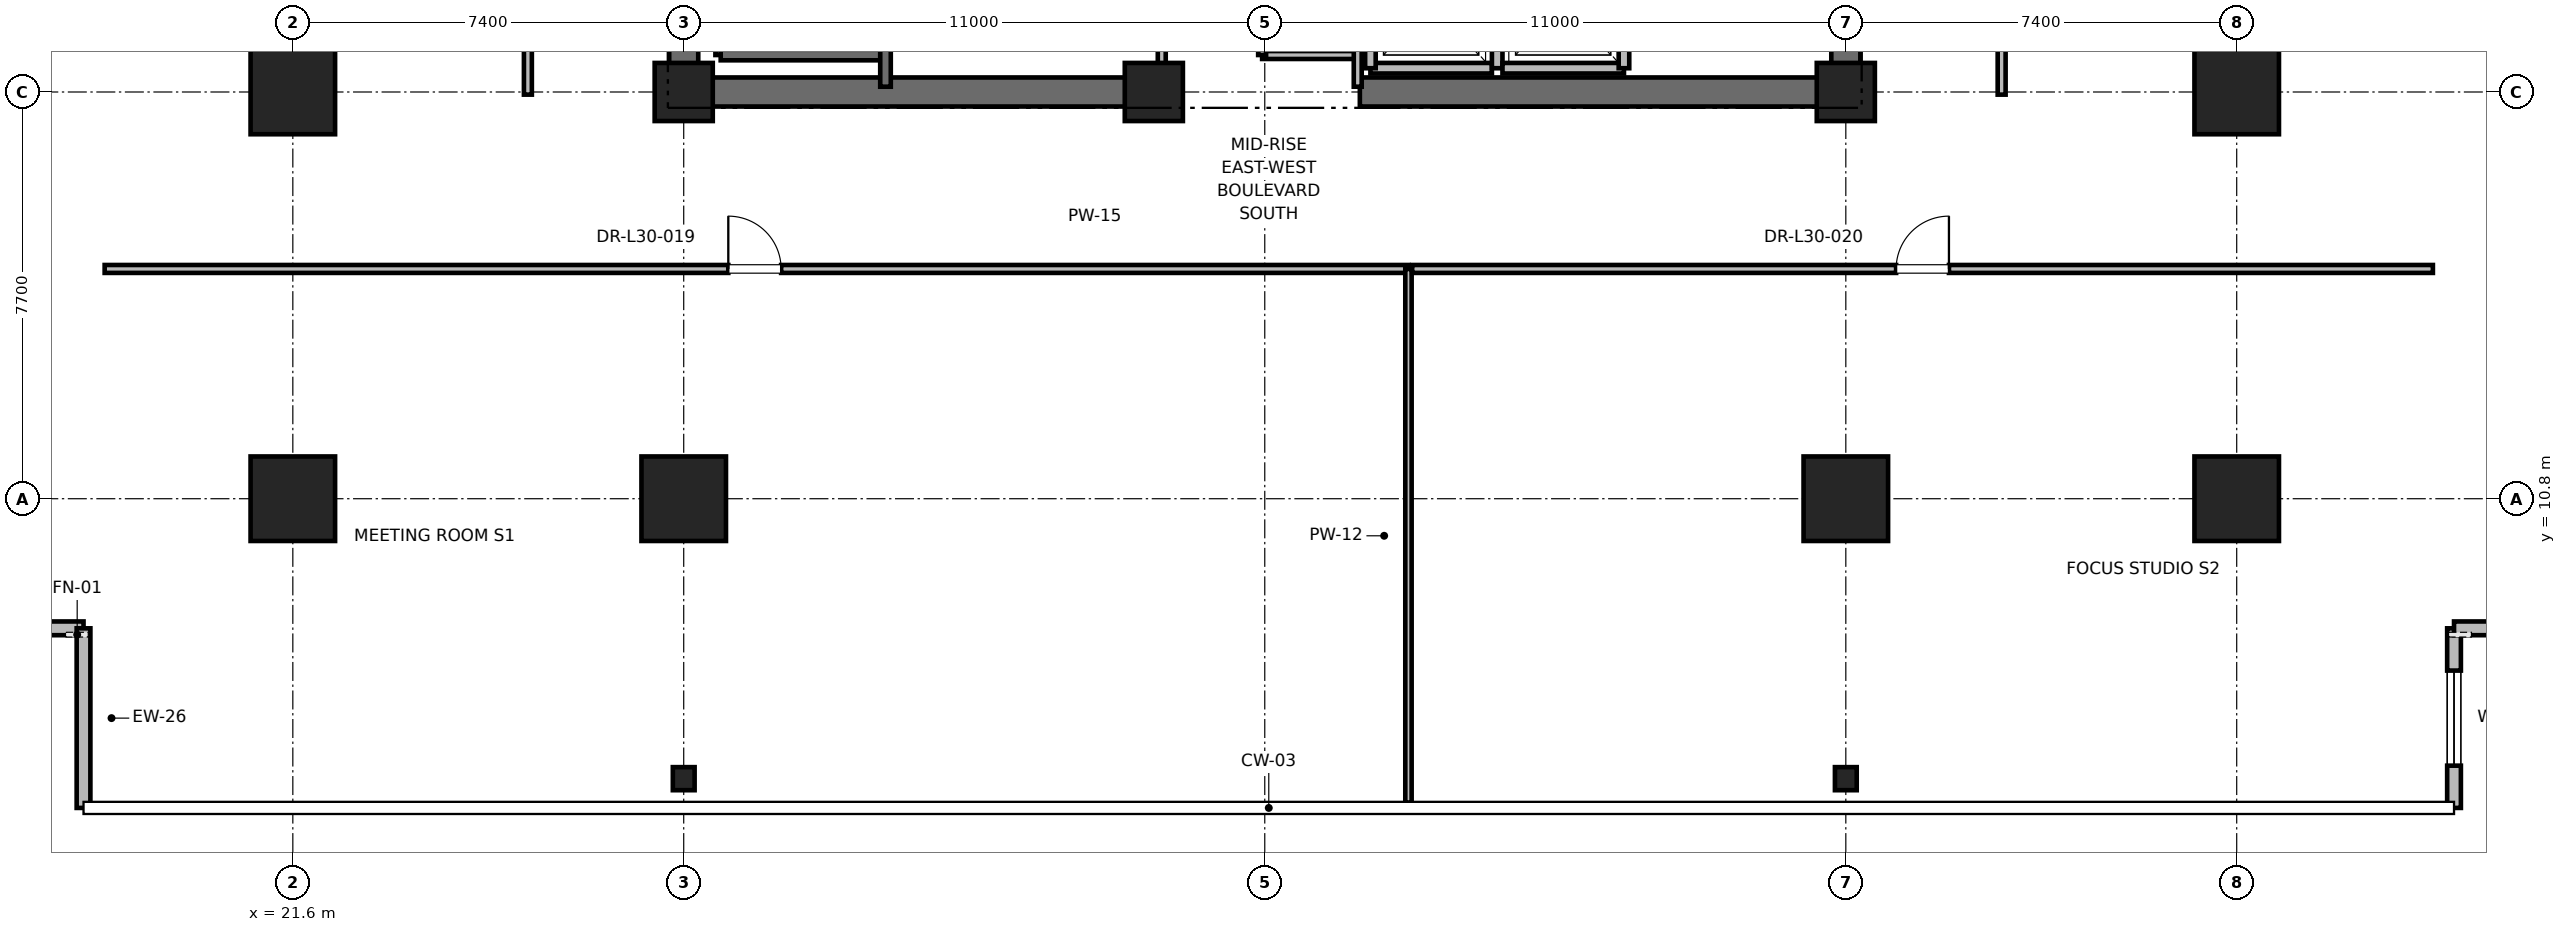
"""IFC4 building model, lengths in metres.
Left out: names, types, materials, properties, quantities, classifications, styles, units other than length and angle.
Written with IfcOpenShell. Run it as: python <this file> out.ifc"""

import sys

from ifc_helpers import new_model, si_unit, direction, frame, frame_2d, origin, origin_2d, place, context, subcontext, project, spatial, rectangle, i_section, extrude, element, fill, save


model = new_model("IFC4")
c1 = context("Model", 3, precision=1e-05, world=origin(), true_north=direction((0.0, 1.0)))
c2 = subcontext(c1, "Body", "Model", "MODEL_VIEW")
j1 = project(units=[si_unit("LENGTHUNIT", "METRE"), si_unit("PLANEANGLEUNIT", "RADIAN")], contexts=[c1])
p1 = place(None, origin())
s1 = spatial("IfcSite", under=j1, at=p1, CompositionType="ELEMENT")
p2 = place(p1, origin())
s2 = spatial("IfcBuilding", under=s1, at=p2, CompositionType="ELEMENT")
p3 = place(p2, frame((0.0, 0.0, 132.4)))
s3 = spatial("IfcBuildingStorey", under=s2, at=p3, CompositionType="ELEMENT", Elevation=132.4)
for number, where, z_axis, x_axis in (
    (1, (29.0, 10.8, 0.0), (0.0, 0.0, 1.0), (1.0, 0.0, 0.0)),
    (2, (51.0, 10.8, 0.0), (0.0, 0.0, 1.0), (1.0, 0.0, 0.0)),
    (3, (21.6, 18.5, 0.0), (0.0, 0.0, 1.0), (1.0, 0.0, 0.0)),
    (4, (58.4, 18.5, 0.0), (0.0, 0.0, 1.0), (1.0, 0.0, 0.0)),
    (5, (21.6, 10.8, 0.0), (0.0, 0.0, 1.0), (1.0, 0.0, 0.0)),
    (6, (58.4, 10.8, 0.0), (0.0, 0.0, 1.0), (1.0, 0.0, 0.0)),
):
    element("IfcColumn", number, at=place(p3, frame(where, z_axis=z_axis, x_axis=x_axis)), inside=s3, PredefinedType="COLUMN", context=c2, shape_type="SweptSolid", body=[
        extrude(rectangle(XDim=1.6, YDim=1.6, at=origin_2d()), origin(), (0.0, 0.0, 1.0), 4.0),
    ])
for number, where, z_axis, x_axis in (
    (7, (29.0, 5.5, 0.0), (0.0, 0.0, 1.0), (1.0, 0.0, 0.0)),
    (8, (51.0, 5.5, 0.0), (0.0, 0.0, 1.0), (1.0, 0.0, 0.0)),
):
    element("IfcColumn", number, at=place(p3, frame(where, z_axis=z_axis, x_axis=x_axis)), inside=s3, PredefinedType="COLUMN", context=c2, shape_type="SweptSolid", body=[
        extrude(i_section(OverallWidth=0.412, OverallDepth=0.437, WebThickness=0.036, FlangeThickness=0.058, FilletRadius=0.015, at=origin_2d()), origin(), (0.0, 0.0, 1.0), 4.0),
    ])
for number, where, z_axis, x_axis in (
    (9, (29.0, 18.5, 0.0), (0.0, 0.0, 1.0), (1.0, 0.0, 0.0)),
    (10, (51.0, 18.5, 0.0), (0.0, 0.0, 1.0), (1.0, 0.0, 0.0)),
    (11, (37.9, 18.5, 0.0), (0.0, 0.0, 1.0), (1.0, 0.0, 0.0)),
):
    element("IfcColumn", number, at=place(p3, frame(where, z_axis=z_axis, x_axis=x_axis)), inside=s3, PredefinedType="PILASTER", context=c2, shape_type="SweptSolid", body=[
        extrude(rectangle(XDim=1.1, YDim=1.1, at=origin_2d()), origin(), (0.0, 0.0, 1.0), 4.0),
    ])
for number, where, z_axis, x_axis in (
    (12, (29.0, 18.5, 0.0), (0.0, 0.0, 1.0), (1.0, 0.0, 0.0)),
    (13, (41.8, 18.5, 0.0), (0.0, 0.0, 1.0), (1.0, 0.0, 0.0)),
):
    element("IfcWall", number, at=place(p3, frame(where, z_axis=z_axis, x_axis=x_axis)), inside=s3, PredefinedType="SHEAR", context=c2, shape_type="SweptSolid", body=[
        extrude(rectangle(XDim=9.2, YDim=0.55, at=frame_2d((4.6, 0.0))), origin(), (0.0, 0.0, 1.0), 3.775),
    ])
p4 = place(p3, frame((29.0, 18.5, 0.0), z_axis=(0.0, 0.0, 1.0), x_axis=(0.0, 1.0, 0.0)))
e14 = element("IfcWall", 14, at=p4, inside=s3, PredefinedType="SHEAR", context=c2, shape_type="SweptSolid", body=[
    extrude(rectangle(XDim=8.8, YDim=0.55, at=frame_2d((4.4, 0.0))), origin(), (0.0, 0.0, 1.0), 3.775),
])
p5 = place(p3, frame((51.0, 18.5, 0.0), z_axis=(0.0, 0.0, 1.0), x_axis=(0.0, 1.0, 0.0)))
e15 = element("IfcWall", 15, at=p5, inside=s3, PredefinedType="SHEAR", context=c2, shape_type="SweptSolid", body=[
    extrude(rectangle(XDim=5.8, YDim=0.55, at=frame_2d((2.9, 0.0))), origin(), (0.0, 0.0, 1.0), 3.775),
])
p6 = place(p3, frame((13.838, 8.346, 0.0), z_axis=(0.0, 0.0, 1.0), x_axis=(1.0, 0.0, 0.0)))
e16 = element("IfcWall", 16, at=p6, inside=s3, PredefinedType="PARAPET", context=c2, shape_type="SweptSolid", body=[
    extrude(rectangle(XDim=3.8, YDim=0.26, at=frame_2d((1.9, 0.0))), origin(), (0.0, 0.0, 1.0), 3.775),
])
p7 = place(p6, frame((1.0, 0.0, 0.85)))
e17 = element("IfcOpeningElement", 17, at=p7, cuts=e16, PredefinedType="OPENING", context=c2, shape_type="SweptSolid", body=[
    extrude(rectangle(XDim=1.8, YDim=2.2, at=frame_2d((0.9, 1.1))), frame((0.0, 0.13, 0.0), z_axis=(0.0, -1.0, 0.0), x_axis=(1.0, 0.0, 0.0)), (0.0, 0.0, 1.0), 0.26),
])
p8 = place(p3, frame((17.638, 8.346, 0.0), z_axis=(0.0, 0.0, 1.0), x_axis=(0.0, -1.0, 0.0)))
e18 = element("IfcWall", 18, at=p8, inside=s3, PredefinedType="PARAPET", context=c2, shape_type="SweptSolid", body=[
    extrude(rectangle(XDim=3.4, YDim=0.26, at=frame_2d((1.7, 0.0))), origin(), (0.0, 0.0, 1.0), 3.775),
])
p9 = place(p3, frame((62.514, 4.946, 0.0), z_axis=(0.0, 0.0, 1.0), x_axis=(0.0, 1.0, 0.0)))
e19 = element("IfcWall", 19, at=p9, inside=s3, PredefinedType="PARAPET", context=c2, shape_type="SweptSolid", body=[
    extrude(rectangle(XDim=3.4, YDim=0.26, at=frame_2d((1.7, 0.0))), origin(), (0.0, 0.0, 1.0), 3.775),
])
p10 = place(p9, frame((0.8, 0.0, 0.85)))
e20 = element("IfcOpeningElement", 20, at=p10, cuts=e19, PredefinedType="OPENING", context=c2, shape_type="SweptSolid", body=[
    extrude(rectangle(XDim=1.8, YDim=2.2, at=frame_2d((0.9, 1.1))), frame((0.0, 0.13, 0.0), z_axis=(0.0, -1.0, 0.0), x_axis=(1.0, 0.0, 0.0)), (0.0, 0.0, 1.0), 0.26),
])
p11 = place(p3, frame((62.514, 8.346, 0.0), z_axis=(0.0, 0.0, 1.0), x_axis=(1.0, 0.0, 0.0)))
e21 = element("IfcWall", 21, at=p11, inside=s3, PredefinedType="PARAPET", context=c2, shape_type="SweptSolid", body=[
    extrude(rectangle(XDim=3.8, YDim=0.26, at=frame_2d((1.9, 0.0))), origin(), (0.0, 0.0, 1.0), 3.775),
])
p12 = place(p3, frame((29.7, 19.2, 0.0), z_axis=(0.0, 0.0, 1.0), x_axis=(0.0, 1.0, 0.0)))
e22 = element("IfcWall", 22, at=p12, inside=s3, PredefinedType="SOLIDWALL", context=c2, shape_type="SweptSolid", body=[
    extrude(rectangle(XDim=8.15, YDim=0.2, at=frame_2d((4.075, 0.0))), origin(), (0.0, 0.0, 1.0), 3.775),
])
p13 = place(p3, frame((29.7, 19.2, 0.0), z_axis=(0.0, 0.0, 1.0), x_axis=(1.0, 0.0, 0.0)))
e23 = element("IfcWall", 23, at=p13, inside=s3, PredefinedType="SOLIDWALL", context=c2, shape_type="SweptSolid", body=[
    extrude(rectangle(XDim=3.12, YDim=0.2, at=frame_2d((1.56, 0.0))), origin(), (0.0, 0.0, 1.0), 3.775),
])
p14 = place(p3, frame((32.82, 18.6, 0.0), z_axis=(0.0, 0.0, 1.0), x_axis=(0.0, 1.0, 0.0)))
e24 = element("IfcWall", 24, at=p14, inside=s3, PredefinedType="SOLIDWALL", context=c2, shape_type="SweptSolid", body=[
    extrude(rectangle(XDim=8.78, YDim=0.2, at=frame_2d((4.39, 0.0))), origin(), (0.0, 0.0, 1.0), 3.775),
])
p15 = place(p3, frame((42.0, 18.95, 0.0), z_axis=(0.0, 0.0, 1.0), x_axis=(1.0, 0.0, 0.0)))
e25 = element("IfcWall", 25, at=p15, inside=s3, PredefinedType="SOLIDWALL", context=c2, shape_type="SweptSolid", body=[
    extrude(rectangle(XDim=2.3, YDim=0.2, at=frame_2d((1.15, 0.0))), origin(), (0.0, 0.0, 1.0), 2.755),
])
p16 = place(p3, frame((42.0, 21.55, 0.0), z_axis=(0.0, 0.0, 1.0), x_axis=(0.0, -1.0, 0.0)))
e26 = element("IfcWall", 26, at=p16, inside=s3, PredefinedType="SOLIDWALL", context=c2, shape_type="SweptSolid", body=[
    extrude(rectangle(XDim=2.6, YDim=0.2, at=frame_2d((1.3, 0.0))), origin(), (0.0, 0.0, 1.0), 2.755),
])
p17 = place(p3, frame((44.4, 18.95, 0.0), z_axis=(0.0, 0.0, 1.0), x_axis=(0.0, 1.0, 0.0)))
e27 = element("IfcWall", 27, at=p17, inside=s3, PredefinedType="SOLIDWALL", context=c2, shape_type="SweptSolid", body=[
    extrude(rectangle(XDim=2.6, YDim=0.2, at=frame_2d((1.3, 0.0))), origin(), (0.0, 0.0, 1.0), 3.775),
])
p18 = place(p3, frame((44.5, 18.95, 0.0), z_axis=(0.0, 0.0, 1.0), x_axis=(1.0, 0.0, 0.0)))
e28 = element("IfcWall", 28, at=p18, inside=s3, PredefinedType="SOLIDWALL", context=c2, shape_type="SweptSolid", body=[
    extrude(rectangle(XDim=2.3, YDim=0.2, at=frame_2d((1.15, 0.0))), origin(), (0.0, 0.0, 1.0), 3.775),
])
p19 = place(p3, frame((46.8, 18.95, 0.0), z_axis=(0.0, 0.0, 1.0), x_axis=(0.0, 1.0, 0.0)))
e29 = element("IfcWall", 29, at=p19, inside=s3, PredefinedType="SOLIDWALL", context=c2, shape_type="SweptSolid", body=[
    extrude(rectangle(XDim=2.6, YDim=0.2, at=frame_2d((1.3, 0.0))), origin(), (0.0, 0.0, 1.0), 3.775),
])
p20 = place(p3, frame((39.95, 19.2, 0.0), z_axis=(0.0, 0.0, 1.0), x_axis=(1.0, 0.0, 0.0)))
e30 = element("IfcWall", 30, at=p20, inside=s3, PredefinedType="PARTITIONING", context=c2, shape_type="SweptSolid", body=[
    extrude(rectangle(XDim=1.81, YDim=0.15, at=frame_2d((0.905, 0.0))), origin(), (0.0, 0.0, 1.0), 2.85),
])
p21 = place(p3, frame((41.76, 18.6, 0.0), z_axis=(0.0, 0.0, 1.0), x_axis=(0.0, 1.0, 0.0)))
e31 = element("IfcWall", 31, at=p21, inside=s3, PredefinedType="PARTITIONING", context=c2, shape_type="SweptSolid", body=[
    extrude(rectangle(XDim=3.6, YDim=0.15, at=frame_2d((1.8, 0.0))), origin(), (0.0, 0.0, 1.0), 2.755),
])
p22 = place(p3, frame((39.95, 19.2, 0.0), z_axis=(0.0, 0.0, 1.0), x_axis=(0.0, 1.0, 0.0)))
e32 = element("IfcWall", 32, at=p22, inside=s3, PredefinedType="PARTITIONING", context=c2, shape_type="SweptSolid", body=[
    extrude(rectangle(XDim=3.0, YDim=0.15, at=frame_2d((1.5, 0.0))), origin(), (0.0, 0.0, 1.0), 2.85),
])
p23 = place(p22, frame((1.05, 0.0, 0.0)))
e33 = element("IfcOpeningElement", 33, at=p23, cuts=e32, PredefinedType="OPENING", context=c2, shape_type="SweptSolid", body=[
    extrude(rectangle(XDim=0.9, YDim=2.1, at=frame_2d((0.45, 1.05))), frame((0.0, 0.075, 0.0), z_axis=(0.0, -1.0, 0.0), x_axis=(1.0, 0.0, 0.0)), (0.0, 0.0, 1.0), 0.15),
])
p24 = place(p3, frame((38.05, 18.6, 0.0), z_axis=(0.0, 0.0, 1.0), x_axis=(0.0, 1.0, 0.0)))
e34 = element("IfcWall", 34, at=p24, inside=s3, PredefinedType="PARTITIONING", context=c2, shape_type="SweptSolid", body=[
    extrude(rectangle(XDim=4.46, YDim=0.15, at=frame_2d((2.23, 0.0))), origin(), (0.0, 0.0, 1.0), 2.755),
])
p25 = place(p24, frame((1.73, 0.0, 0.0)))
e35 = element("IfcOpeningElement", 35, at=p25, cuts=e34, PredefinedType="OPENING", context=c2, shape_type="SweptSolid", body=[
    extrude(rectangle(XDim=1.0, YDim=2.15, at=frame_2d((0.5, 1.075))), frame((0.0, 0.075, 0.0), z_axis=(0.0, -1.0, 0.0), x_axis=(1.0, 0.0, 0.0)), (0.0, 0.0, 1.0), 0.15),
])
p26 = place(p3, frame((18.038, 15.15, 0.0), z_axis=(0.0, 0.0, 1.0), x_axis=(1.0, 0.0, 0.0)))
e36 = element("IfcWall", 36, at=p26, inside=s3, PredefinedType="PARTITIONING", context=c2, shape_type="SweptSolid", body=[
    extrude(rectangle(XDim=24.683, YDim=0.15, at=frame_2d((12.341, 0.0))), origin(), (0.0, 0.0, 1.0), 2.85),
])
p27 = place(p26, frame((11.806, 0.0, 0.0)))
e37 = element("IfcOpeningElement", 37, at=p27, cuts=e36, PredefinedType="OPENING", context=c2, shape_type="SweptSolid", body=[
    extrude(rectangle(XDim=1.0, YDim=2.15, at=frame_2d((0.5, 1.075))), frame((0.0, 0.075, 0.0), z_axis=(0.0, -1.0, 0.0), x_axis=(1.0, 0.0, 0.0)), (0.0, 0.0, 1.0), 0.15),
])
p28 = place(p3, frame((42.72, 5.046, 0.0), z_axis=(0.0, 0.0, 1.0), x_axis=(0.0, 1.0, 0.0)))
e38 = element("IfcWall", 38, at=p28, inside=s3, PredefinedType="PARTITIONING", context=c2, shape_type="SweptSolid", body=[
    extrude(rectangle(XDim=10.104, YDim=0.12, at=frame_2d((5.052, 0.0))), origin(), (0.0, 0.0, 1.0), 2.405),
])
p29 = place(p3, frame((42.79, 15.15, 0.0), z_axis=(0.0, 0.0, 1.0), x_axis=(1.0, 0.0, 0.0)))
e39 = element("IfcWall", 39, at=p29, inside=s3, PredefinedType="PARTITIONING", context=c2, shape_type="SweptSolid", body=[
    extrude(rectangle(XDim=19.324, YDim=0.15, at=frame_2d((9.662, 0.0))), origin(), (0.0, 0.0, 1.0), 2.85),
])
p30 = place(p29, frame((9.162, 0.0, 0.0)))
e40 = element("IfcOpeningElement", 40, at=p30, cuts=e39, PredefinedType="OPENING", context=c2, shape_type="SweptSolid", body=[
    extrude(rectangle(XDim=1.0, YDim=2.15, at=frame_2d((0.5, 1.075))), frame((0.0, 0.075, 0.0), z_axis=(0.0, -1.0, 0.0), x_axis=(1.0, 0.0, 0.0)), (0.0, 0.0, 1.0), 0.15),
])
p31 = place(p3, frame((26.05, 18.45, 0.0), z_axis=(0.0, 0.0, 1.0), x_axis=(0.0, 1.0, 0.0)))
e41 = element("IfcWall", 41, at=p31, inside=s3, PredefinedType="PARTITIONING", context=c2, shape_type="SweptSolid", body=[
    extrude(rectangle(XDim=7.602, YDim=0.15, at=frame_2d((3.801, 0.0))), origin(), (0.0, 0.0, 1.0), 2.85),
])
p32 = place(p31, frame((3.341, 0.0, 0.0)))
e42 = element("IfcOpeningElement", 42, at=p32, cuts=e41, PredefinedType="OPENING", context=c2, shape_type="SweptSolid", body=[
    extrude(rectangle(XDim=1.0, YDim=2.15, at=frame_2d((0.5, 1.075))), frame((0.0, 0.075, 0.0), z_axis=(0.0, -1.0, 0.0), x_axis=(1.0, 0.0, 0.0)), (0.0, 0.0, 1.0), 0.15),
])
p33 = place(p3, frame((53.95, 18.45, 0.0), z_axis=(0.0, 0.0, 1.0), x_axis=(0.0, 1.0, 0.0)))
e43 = element("IfcWall", 43, at=p33, inside=s3, PredefinedType="PARTITIONING", context=c2, shape_type="SweptSolid", body=[
    extrude(rectangle(XDim=18.1, YDim=0.15, at=frame_2d((9.05, 0.0))), origin(), (0.0, 0.0, 1.0), 2.85),
])
p34 = place(p33, frame((8.55, 0.0, 0.0)))
e44 = element("IfcOpeningElement", 44, at=p34, cuts=e43, PredefinedType="OPENING", context=c2, shape_type="SweptSolid", body=[
    extrude(rectangle(XDim=1.0, YDim=2.15, at=frame_2d((0.5, 1.075))), frame((0.0, 0.075, 0.0), z_axis=(0.0, -1.0, 0.0), x_axis=(1.0, 0.0, 0.0)), (0.0, 0.0, 1.0), 0.15),
])
p35 = place(p10, origin())
e45 = element("IfcWindow", 45, at=p35, inside=s3, PartitioningType="SINGLE_PANEL", PredefinedType="WINDOW", context=c2, shape_type="SweptSolid", body=[
    extrude(rectangle(XDim=1.8, YDim=2.2, at=frame_2d((0.9, 1.1))), frame((0.0, 0.03, 0.0), z_axis=(0.0, -1.0, 0.0), x_axis=(1.0, 0.0, 0.0)), (0.0, 0.0, 1.0), 0.06),
])
fill(e20, e45)
p36 = place(p27, origin())
e46 = element("IfcDoor", 46, at=p36, inside=s3, OperationType="SINGLE_SWING_LEFT", PredefinedType="DOOR", context=c2, shape_type="SweptSolid", body=[
    extrude(rectangle(XDim=1.0, YDim=2.15, at=frame_2d((0.5, 1.075))), frame((0.0, 0.025, 0.0), z_axis=(0.0, -1.0, 0.0), x_axis=(1.0, 0.0, 0.0)), (0.0, 0.0, 1.0), 0.05),
])
fill(e37, e46)
p37 = place(p30, origin())
e47 = element("IfcDoor", 47, at=p37, inside=s3, OperationType="SINGLE_SWING_RIGHT", PredefinedType="DOOR", context=c2, shape_type="SweptSolid", body=[
    extrude(rectangle(XDim=1.0, YDim=2.15, at=frame_2d((0.5, 1.075))), frame((0.0, 0.025, 0.0), z_axis=(0.0, -1.0, 0.0), x_axis=(1.0, 0.0, 0.0)), (0.0, 0.0, 1.0), 0.05),
])
fill(e40, e47)
save(model, sys.argv[1])
